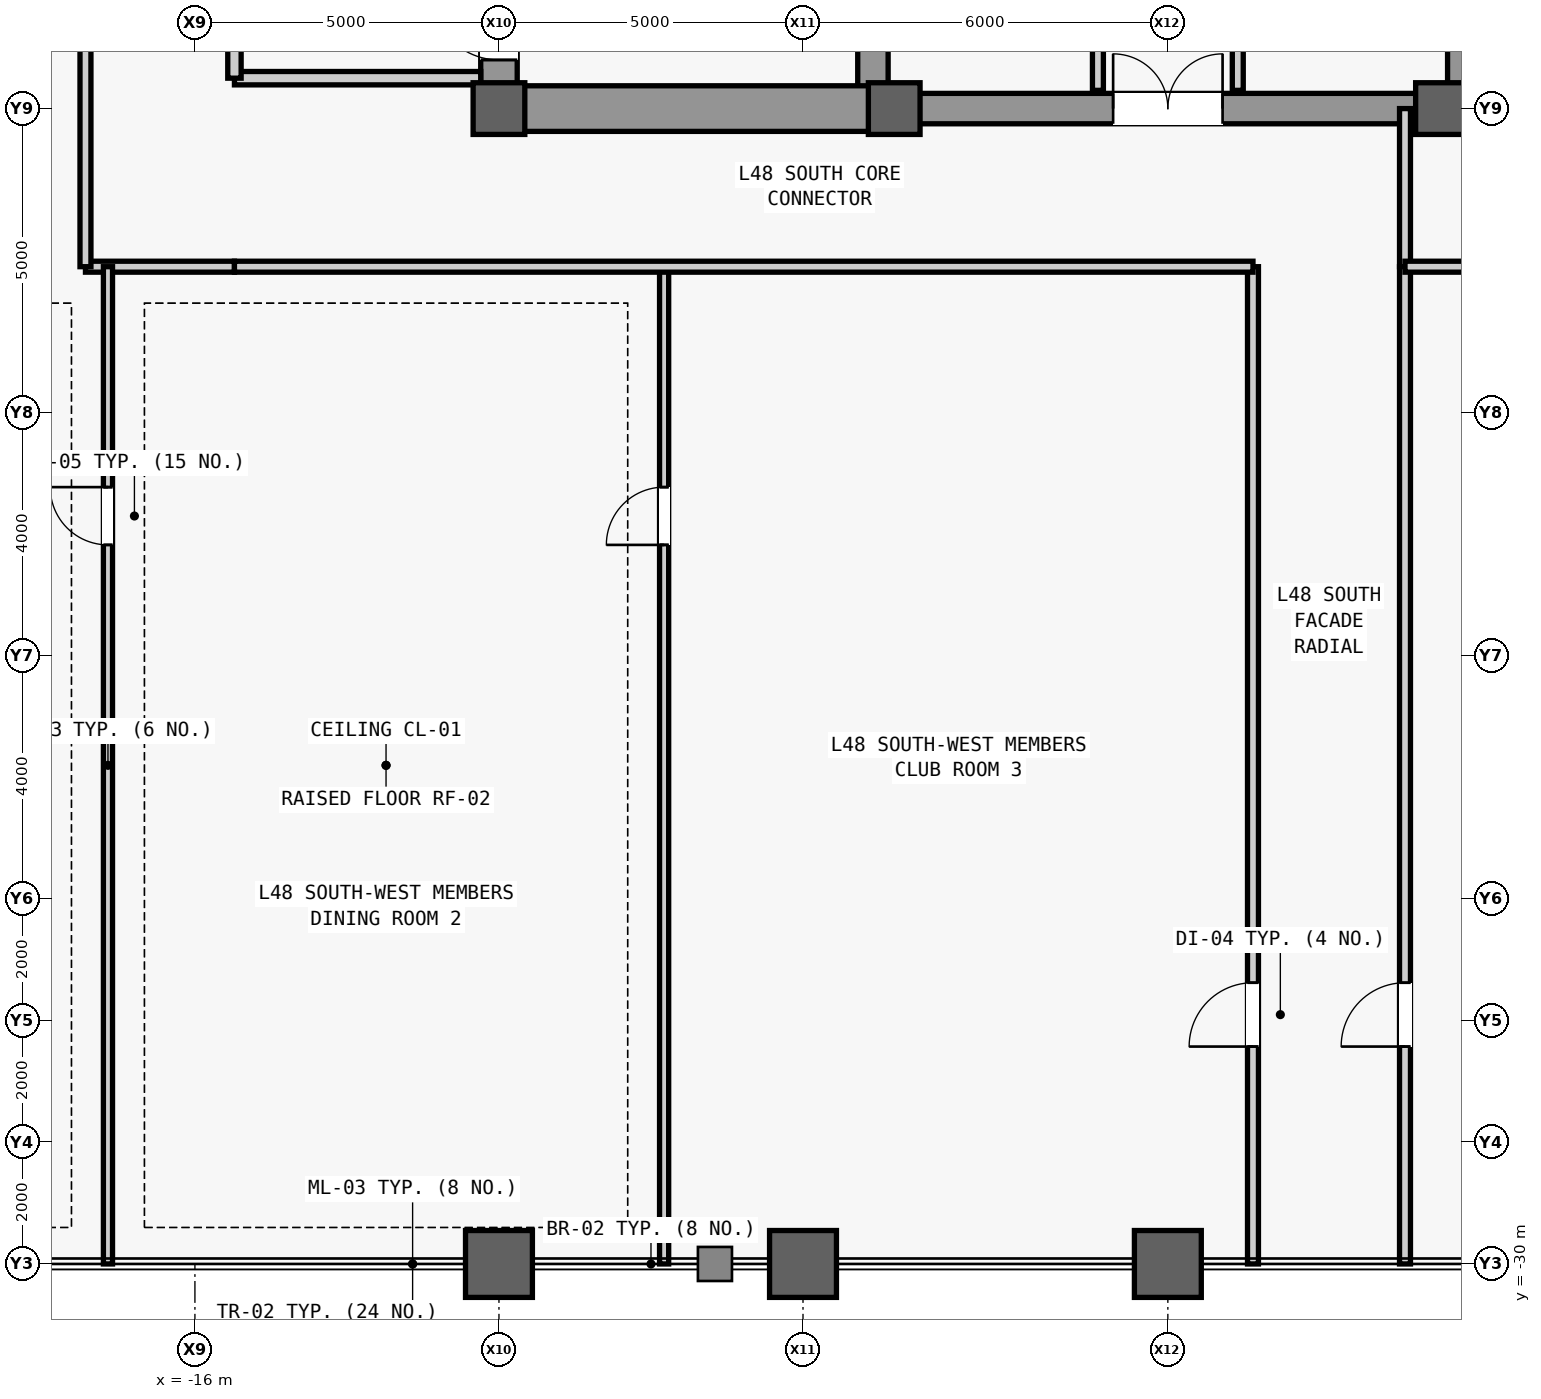
"""IFC4 building model, lengths in metres.
Left out: names, types, materials, properties, quantities, classifications, styles, units other than length and angle.
Written with IfcOpenShell. Run it as: python <this file> out.ifc"""

import sys

from ifc_helpers import new_model, si_unit, direction, frame, frame_2d, origin, origin_2d, place, context, subcontext, project, spatial, rectangle, hollow_rectangle, extrude, source, transform, mapped, element, fill, save


model = new_model("IFC4")
c1 = context("Model", 3, precision=1e-05, world=origin(), true_north=direction((0.0, 1.0)))
c2 = subcontext(c1, "Body", "Model", "MODEL_VIEW")
j1 = project(units=[si_unit("LENGTHUNIT", "METRE"), si_unit("PLANEANGLEUNIT", "RADIAN")], contexts=[c1])
p1 = place(None, origin())
s1 = spatial("IfcSite", under=j1, at=p1, CompositionType="ELEMENT")
p2 = place(p1, origin())
s2 = spatial("IfcBuilding", under=s1, at=p2, CompositionType="ELEMENT")
p3 = place(p2, frame((0.0, 0.0, 207.1)))
s3 = spatial("IfcBuildingStorey", under=s2, at=p3, CompositionType="ELEMENT", Elevation=207.1)
m1 = source(origin(), c2, "Body", "SweptSolid", [
    extrude(rectangle(XDim=22.0, YDim=0.6, at=frame_2d((11.0, 0.0))), origin(), (0.0, 0.0, 1.0), 3.78),
])
p4 = place(p3, frame((-11.0, -11.0, 0.0), z_axis=(0.0, 0.0, 1.0), x_axis=(0.0, 1.0, 0.0)))
e1 = element("IfcWall", 1, at=p4, inside=s3, PredefinedType="SHEAR", context=c2, shape_type="MappedRepresentation", body=[
    mapped(m1, transform((0.0, 0.0, 0.0), scale=1.0)),
])
m2 = source(origin(), c2, "Body", "SweptSolid", [
    extrude(rectangle(XDim=1.1, YDim=2.2, at=frame_2d((0.55, 1.1))), frame((0.0, 0.31, 0.0), z_axis=(0.0, -1.0, 0.0), x_axis=(1.0, 0.0, 0.0)), (0.0, 0.0, 1.0), 0.62),
])
p5 = place(p4, frame((0.8, 0.0, 0.0)))
e2 = element("IfcOpeningElement", 2, at=p5, cuts=e1, PredefinedType="OPENING", context=c2, shape_type="MappedRepresentation", body=[
    mapped(m2, transform((0.0, 0.0, 0.0), scale=1.0)),
])
p6 = place(p4, frame((12.5, 0.0, 0.0)))
e3 = element("IfcOpeningElement", 3, at=p6, cuts=e1, PredefinedType="OPENING", context=c2, shape_type="MappedRepresentation", body=[
    mapped(m2, transform((0.0, 0.0, 0.0), scale=1.0)),
])
m3 = source(origin(), c2, "Body", "SweptSolid", [
    extrude(rectangle(XDim=0.9, YDim=2.15, at=frame_2d((0.45, 1.075))), frame((0.0, 0.31, 0.0), z_axis=(0.0, -1.0, 0.0), x_axis=(1.0, 0.0, 0.0)), (0.0, 0.0, 1.0), 0.62),
])
p7 = place(p4, frame((7.575, 0.0, 0.0)))
e4 = element("IfcOpeningElement", 4, at=p7, cuts=e1, PredefinedType="OPENING", context=c2, shape_type="MappedRepresentation", body=[
    mapped(m3, transform((0.0, 0.0, 0.0), scale=1.0)),
])
m4 = source(origin(), c2, "Body", "SweptSolid", [
    extrude(rectangle(XDim=1.3, YDim=2.3, at=frame_2d((0.65, 1.15))), frame((0.0, 0.31, 0.0), z_axis=(0.0, -1.0, 0.0), x_axis=(1.0, 0.0, 0.0)), (0.0, 0.0, 1.0), 0.62),
])
p8 = place(p4, frame((2.7, 0.0, 0.0)))
e5 = element("IfcOpeningElement", 5, at=p8, cuts=e1, PredefinedType="OPENING", context=c2, shape_type="MappedRepresentation", body=[
    mapped(m4, transform((0.0, 0.0, 0.0), scale=1.0)),
])
m5 = source(origin(), c2, "Body", "SweptSolid", [
    extrude(rectangle(XDim=21.4, YDim=0.5, at=frame_2d((10.7, 0.0))), origin(), (0.0, 0.0, 1.0), 3.78),
])
for number, where, z_axis, x_axis in (
    (6, (-4.85, -10.7, 0.0), (0.0, 0.0, 1.0), (0.0, 1.0, 0.0)),
    (7, (4.85, -10.7, 0.0), (0.0, 0.0, 1.0), (0.0, 1.0, 0.0)),
):
    element("IfcWall", number, at=place(p3, frame(where, z_axis=z_axis, x_axis=x_axis)), inside=s3, PredefinedType="SHEAR", context=c2, shape_type="MappedRepresentation", body=[
        mapped(m5, transform((0.0, 0.0, 0.0), scale=1.0)),
    ])
m6 = source(origin(), c2, "Body", "SweptSolid", [
    extrude(rectangle(XDim=5.85, YDim=0.75, at=frame_2d((2.925, 0.0))), origin(), (0.0, 0.0, 1.0), 3.78),
])
p9 = place(p3, frame((-10.7, -11.0, 0.0), z_axis=(0.0, 0.0, 1.0), x_axis=(1.0, 0.0, 0.0)))
e8 = element("IfcWall", 8, at=p9, inside=s3, PredefinedType="SHEAR", context=c2, shape_type="MappedRepresentation", body=[
    mapped(m6, transform((0.0, 0.0, 0.0), scale=1.0)),
])
m7 = source(origin(), c2, "Body", "SweptSolid", [
    extrude(rectangle(XDim=9.2, YDim=0.5, at=frame_2d((4.6, 0.0))), origin(), (0.0, 0.0, 1.0), 3.78),
])
p10 = place(p3, frame((-4.6, -11.0, 0.0), z_axis=(0.0, 0.0, 1.0), x_axis=(1.0, 0.0, 0.0)))
e9 = element("IfcWall", 9, at=p10, inside=s3, PredefinedType="SHEAR", context=c2, shape_type="MappedRepresentation", body=[
    mapped(m7, transform((0.0, 0.0, 0.0), scale=1.0)),
])
m8 = source(origin(), c2, "Body", "SweptSolid", [
    extrude(rectangle(XDim=1.8, YDim=2.25, at=frame_2d((0.9, 1.125))), frame((0.0, 0.26, 0.0), z_axis=(0.0, -1.0, 0.0), x_axis=(1.0, 0.0, 0.0)), (0.0, 0.0, 1.0), 0.52),
])
p11 = place(p10, frame((3.7, 0.0, 0.0)))
e10 = element("IfcOpeningElement", 10, at=p11, cuts=e9, PredefinedType="OPENING", context=c2, shape_type="MappedRepresentation", body=[
    mapped(m8, transform((0.0, 0.0, 0.0), scale=1.0)),
])
m9 = source(origin(), c2, "Body", "SweptSolid", [
    extrude(hollow_rectangle(XDim=1.1, YDim=1.1, WallThickness=0.06, at=origin_2d()), origin(), (0.0, 0.0, 1.0), 4.0),
])
p12 = place(p3, frame((-11.0, -30.0, 0.0), z_axis=(0.0, 0.0, 1.0), x_axis=(1.0, 0.0, 0.0)))
e11 = element("IfcColumn", 11, at=p12, inside=s3, PredefinedType="COLUMN", context=c2, shape_type="MappedRepresentation", body=[
    mapped(m9, transform((0.0, 0.0, 0.0), scale=1.0)),
])
m10 = source(origin(), c2, "Body", "SweptSolid", [
    extrude(rectangle(XDim=0.85, YDim=0.85, at=origin_2d()), origin(), (0.0, 0.0, 1.0), 4.0),
])
p13 = place(p3, frame((-11.0, -11.0, 0.0), z_axis=(0.0, 0.0, 1.0), x_axis=(1.0, 0.0, 0.0)))
e12 = element("IfcColumn", 12, at=p13, inside=s3, PredefinedType="COLUMN", context=c2, shape_type="MappedRepresentation", body=[
    mapped(m10, transform((0.0, 0.0, 0.0), scale=1.0)),
])
p14 = place(p3, frame((-6.0, -30.0, 0.0), z_axis=(0.0, 0.0, 1.0), x_axis=(1.0, 0.0, 0.0)))
e13 = element("IfcColumn", 13, at=p14, inside=s3, PredefinedType="COLUMN", context=c2, shape_type="MappedRepresentation", body=[
    mapped(m9, transform((0.0, 0.0, 0.0), scale=1.0)),
])
p15 = place(p3, frame((-4.5, -11.0, 0.0), z_axis=(0.0, 0.0, 1.0), x_axis=(1.0, 0.0, 0.0)))
e14 = element("IfcColumn", 14, at=p15, inside=s3, PredefinedType="COLUMN", context=c2, shape_type="MappedRepresentation", body=[
    mapped(m10, transform((0.0, 0.0, 0.0), scale=1.0)),
])
p16 = place(p3, frame((0.0, -30.0, 0.0), z_axis=(0.0, 0.0, 1.0), x_axis=(1.0, 0.0, 0.0)))
e15 = element("IfcColumn", 15, at=p16, inside=s3, PredefinedType="COLUMN", context=c2, shape_type="MappedRepresentation", body=[
    mapped(m9, transform((0.0, 0.0, 0.0), scale=1.0)),
])
p17 = place(p3, frame((4.5, -11.0, 0.0), z_axis=(0.0, 0.0, 1.0), x_axis=(1.0, 0.0, 0.0)))
e16 = element("IfcColumn", 16, at=p17, inside=s3, PredefinedType="COLUMN", context=c2, shape_type="MappedRepresentation", body=[
    mapped(m10, transform((0.0, 0.0, 0.0), scale=1.0)),
])
m11 = source(origin(), c2, "Body", "SweptSolid", [
    extrude(rectangle(XDim=4.05, YDim=0.22, at=frame_2d((2.025, 0.0))), origin(), (0.0, 0.0, 1.0), 3.78),
])
p18 = place(p3, frame((-15.35, -10.5, 0.0), z_axis=(0.0, 0.0, 1.0), x_axis=(1.0, 0.0, 0.0)))
e17 = element("IfcWall", 17, at=p18, inside=s3, PredefinedType="PARTITIONING", context=c2, shape_type="MappedRepresentation", body=[
    mapped(m11, transform((0.0, 0.0, 0.0), scale=1.0)),
])
m12 = source(origin(), c2, "Body", "SweptSolid", [
    extrude(rectangle(XDim=4.4, YDim=0.22, at=frame_2d((2.2, 0.0))), origin(), (0.0, 0.0, 1.0), 3.78),
])
p19 = place(p3, frame((-15.35, -10.5, 0.0), z_axis=(0.0, 0.0, 1.0), x_axis=(0.0, 1.0, 0.0)))
e18 = element("IfcWall", 18, at=p19, inside=s3, PredefinedType="PARTITIONING", context=c2, shape_type="MappedRepresentation", body=[
    mapped(m12, transform((0.0, 0.0, 0.0), scale=1.0)),
])
m13 = source(origin(), c2, "Body", "SweptSolid", [
    extrude(rectangle(XDim=1.2, YDim=2.2, at=frame_2d((0.6, 1.1))), frame((0.0, 0.12, 0.0), z_axis=(0.0, -1.0, 0.0), x_axis=(1.0, 0.0, 0.0)), (0.0, 0.0, 1.0), 0.24),
])
p20 = place(p19, frame((1.6, 0.0, 0.0)))
e19 = element("IfcOpeningElement", 19, at=p20, cuts=e18, PredefinedType="OPENING", context=c2, shape_type="MappedRepresentation", body=[
    mapped(m13, transform((0.0, 0.0, 0.0), scale=1.0)),
])
m14 = source(origin(), c2, "Body", "SweptSolid", [
    extrude(rectangle(XDim=5.4, YDim=0.18, at=frame_2d((2.7, 0.0))), origin(), (0.0, 0.0, 1.0), 3.78),
])
p21 = place(p3, frame((-1.15, -10.7, 0.0), z_axis=(0.0, 0.0, 1.0), x_axis=(0.0, 1.0, 0.0)))
e20 = element("IfcWall", 20, at=p21, inside=s3, PredefinedType="PARTITIONING", context=c2, shape_type="MappedRepresentation", body=[
    mapped(m14, transform((0.0, 0.0, 0.0), scale=1.0)),
])
m15 = source(origin(), c2, "Body", "SweptSolid", [
    extrude(rectangle(XDim=0.9, YDim=2.15, at=frame_2d((0.45, 1.075))), frame((0.0, 0.1, 0.0), z_axis=(0.0, -1.0, 0.0), x_axis=(1.0, 0.0, 0.0)), (0.0, 0.0, 1.0), 0.2),
])
p22 = place(p21, frame((1.15, 0.0, 0.0)))
e21 = element("IfcOpeningElement", 21, at=p22, cuts=e20, PredefinedType="OPENING", context=c2, shape_type="MappedRepresentation", body=[
    mapped(m15, transform((0.0, 0.0, 0.0), scale=1.0)),
])
p23 = place(p21, frame((3.85, 0.0, 0.0)))
e22 = element("IfcOpeningElement", 22, at=p23, cuts=e20, PredefinedType="OPENING", context=c2, shape_type="MappedRepresentation", body=[
    mapped(m15, transform((0.0, 0.0, 0.0), scale=1.0)),
])
p24 = place(p3, frame((1.15, -10.7, 0.0), z_axis=(0.0, 0.0, 1.0), x_axis=(0.0, 1.0, 0.0)))
e23 = element("IfcWall", 23, at=p24, inside=s3, PredefinedType="PARTITIONING", context=c2, shape_type="MappedRepresentation", body=[
    mapped(m14, transform((0.0, 0.0, 0.0), scale=1.0)),
])
p25 = place(p24, frame((2.25, 0.0, 0.0)))
e24 = element("IfcOpeningElement", 24, at=p25, cuts=e23, PredefinedType="OPENING", context=c2, shape_type="MappedRepresentation", body=[
    mapped(m15, transform((0.0, 0.0, 0.0), scale=1.0)),
])
m16 = source(origin(), c2, "Body", "SweptSolid", [
    extrude(rectangle(XDim=2.45, YDim=0.18, at=frame_2d((1.225, 0.0))), origin(), (0.0, 0.0, 1.0), 3.78),
])
p26 = place(p3, frame((-17.8, -13.6, 0.0), z_axis=(0.0, 0.0, 1.0), x_axis=(1.0, 0.0, 0.0)))
e25 = element("IfcWall", 25, at=p26, inside=s3, PredefinedType="PARTITIONING", context=c2, shape_type="MappedRepresentation", body=[
    mapped(m16, transform((0.0, 0.0, 0.0), scale=1.0)),
])
m17 = source(origin(), c2, "Body", "SweptSolid", [
    extrude(rectangle(XDim=2.6, YDim=0.18, at=frame_2d((1.3, 0.0))), origin(), (0.0, 0.0, 1.0), 3.78),
])
p27 = place(p3, frame((3.9, -13.6, 0.0), z_axis=(0.0, 0.0, 1.0), x_axis=(0.0, 1.0, 0.0)))
e26 = element("IfcWall", 26, at=p27, inside=s3, PredefinedType="PARTITIONING", context=c2, shape_type="MappedRepresentation", body=[
    mapped(m17, transform((0.0, 0.0, 0.0), scale=1.0)),
])
m18 = source(origin(), c2, "Body", "SweptSolid", [
    extrude(rectangle(XDim=16.4, YDim=0.15, at=frame_2d((8.2, 0.0))), origin(), (0.0, 0.0, 1.0), 3.78),
])
p28 = place(p3, frame((-17.43, -30.0, 0.0), z_axis=(0.0, 0.0, 1.0), x_axis=(0.0, 1.0, 0.0)))
e27 = element("IfcWall", 27, at=p28, inside=s3, PredefinedType="PARTITIONING", context=c2, shape_type="MappedRepresentation", body=[
    mapped(m18, transform((0.0, 0.0, 0.0), scale=1.0)),
])
m19 = source(origin(), c2, "Body", "SweptSolid", [
    extrude(rectangle(XDim=0.95, YDim=2.15, at=frame_2d((0.475, 1.075))), frame((0.0, 0.085, 0.0), z_axis=(0.0, -1.0, 0.0), x_axis=(1.0, 0.0, 0.0)), (0.0, 0.0, 1.0), 0.17),
])
p29 = place(p28, frame((11.825, 0.0, 0.0)))
e28 = element("IfcOpeningElement", 28, at=p29, cuts=e27, PredefinedType="OPENING", context=c2, shape_type="MappedRepresentation", body=[
    mapped(m19, transform((0.0, 0.0, 0.0), scale=1.0)),
])
p30 = place(p3, frame((-8.284, -30.0, 0.0), z_axis=(0.0, 0.0, 1.0), x_axis=(0.0, 1.0, 0.0)))
e29 = element("IfcWall", 29, at=p30, inside=s3, PredefinedType="PARTITIONING", context=c2, shape_type="MappedRepresentation", body=[
    mapped(m18, transform((0.0, 0.0, 0.0), scale=1.0)),
])
p31 = place(p30, frame((11.825, 0.0, 0.0)))
e30 = element("IfcOpeningElement", 30, at=p31, cuts=e29, PredefinedType="OPENING", context=c2, shape_type="MappedRepresentation", body=[
    mapped(m19, transform((0.0, 0.0, 0.0), scale=1.0)),
])
m20 = source(origin(), c2, "Body", "SweptSolid", [
    extrude(rectangle(XDim=16.4, YDim=0.18, at=frame_2d((8.2, 0.0))), origin(), (0.0, 0.0, 1.0), 3.78),
])
p32 = place(p3, frame((1.4, -30.0, 0.0), z_axis=(0.0, 0.0, 1.0), x_axis=(0.0, 1.0, 0.0)))
e31 = element("IfcWall", 31, at=p32, inside=s3, PredefinedType="PARTITIONING", context=c2, shape_type="MappedRepresentation", body=[
    mapped(m20, transform((0.0, 0.0, 0.0), scale=1.0)),
])
m21 = source(origin(), c2, "Body", "SweptSolid", [
    extrude(rectangle(XDim=1.05, YDim=2.2, at=frame_2d((0.525, 1.1))), frame((0.0, 0.1, 0.0), z_axis=(0.0, -1.0, 0.0), x_axis=(1.0, 0.0, 0.0)), (0.0, 0.0, 1.0), 0.2),
])
p33 = place(p32, frame((3.575, 0.0, 0.0)))
e32 = element("IfcOpeningElement", 32, at=p33, cuts=e31, PredefinedType="OPENING", context=c2, shape_type="MappedRepresentation", body=[
    mapped(m21, transform((0.0, 0.0, 0.0), scale=1.0)),
])
m22 = source(origin(), c2, "Body", "SweptSolid", [
    extrude(rectangle(XDim=16.75, YDim=0.18, at=frame_2d((8.375, 0.0))), origin(), (0.0, 0.0, 1.0), 3.78),
])
p34 = place(p3, frame((-15.35, -13.6, 0.0), z_axis=(0.0, 0.0, 1.0), x_axis=(1.0, 0.0, 0.0)))
e33 = element("IfcWall", 33, at=p34, inside=s3, PredefinedType="PARTITIONING", context=c2, shape_type="MappedRepresentation", body=[
    mapped(m22, transform((0.0, 0.0, 0.0), scale=1.0)),
])
p35 = place(p3, frame((3.9, -30.0, 0.0), z_axis=(0.0, 0.0, 1.0), x_axis=(0.0, 1.0, 0.0)))
e34 = element("IfcWall", 34, at=p35, inside=s3, PredefinedType="PARTITIONING", context=c2, shape_type="MappedRepresentation", body=[
    mapped(m20, transform((0.0, 0.0, 0.0), scale=1.0)),
])
p36 = place(p35, frame((3.575, 0.0, 0.0)))
e35 = element("IfcOpeningElement", 35, at=p36, cuts=e34, PredefinedType="OPENING", context=c2, shape_type="MappedRepresentation", body=[
    mapped(m21, transform((0.0, 0.0, 0.0), scale=1.0)),
])
m23 = source(origin(), c2, "Body", "SweptSolid", [
    extrude(rectangle(XDim=11.45, YDim=0.18, at=frame_2d((5.725, 0.0))), origin(), (0.0, 0.0, 1.0), 3.78),
])
p37 = place(p3, frame((3.9, -13.6, 0.0), z_axis=(0.0, 0.0, 1.0), x_axis=(1.0, 0.0, 0.0)))
e36 = element("IfcWall", 36, at=p37, inside=s3, PredefinedType="PARTITIONING", context=c2, shape_type="MappedRepresentation", body=[
    mapped(m23, transform((0.0, 0.0, 0.0), scale=1.0)),
])
m24 = source(origin(), c2, "Body", "SweptSolid", [
    extrude(rectangle(XDim=11.6, YDim=0.18, at=frame_2d((5.8, 0.0))), origin(), (0.0, 0.0, 1.0), 3.78),
])
p38 = place(p3, frame((-17.8, -13.6, 0.0), z_axis=(0.0, 0.0, 1.0), x_axis=(0.0, 1.0, 0.0)))
e37 = element("IfcWall", 37, at=p38, inside=s3, PredefinedType="PARTITIONING", context=c2, shape_type="MappedRepresentation", body=[
    mapped(m24, transform((0.0, 0.0, 0.0), scale=1.0)),
])
m25 = source(origin(), c2, "Body", "SweptSolid", [
    extrude(rectangle(XDim=1.1, YDim=2.2, at=frame_2d((0.55, 1.1))), frame((0.0, 0.025, 0.0), z_axis=(0.0, -1.0, 0.0), x_axis=(1.0, 0.0, 0.0)), (0.0, 0.0, 1.0), 0.05),
])
p39 = place(p5, origin())
e38 = element("IfcDoor", 38, at=p39, inside=s3, OperationType="SINGLE_SWING_RIGHT", PredefinedType="DOOR", context=c2, shape_type="MappedRepresentation", body=[
    mapped(m25, transform((0.0, 0.0, 0.0), scale=1.0)),
])
fill(e2, e38)
m26 = source(origin(), c2, "Body", "SweptSolid", [
    extrude(rectangle(XDim=1.8, YDim=2.25, at=frame_2d((0.9, 1.125))), frame((0.0, 0.025, 0.0), z_axis=(0.0, -1.0, 0.0), x_axis=(1.0, 0.0, 0.0)), (0.0, 0.0, 1.0), 0.05),
])
p40 = place(p11, origin())
e39 = element("IfcDoor", 39, at=p40, inside=s3, OperationType="SINGLE_SWING_LEFT", PredefinedType="DOOR", context=c2, shape_type="MappedRepresentation", body=[
    mapped(m26, transform((0.0, 0.0, 0.0), scale=1.0)),
])
fill(e10, e39)
m27 = source(origin(), c2, "Body", "SweptSolid", [
    extrude(rectangle(XDim=0.95, YDim=2.15, at=frame_2d((0.475, 1.075))), frame((0.0, 0.025, 0.0), z_axis=(0.0, -1.0, 0.0), x_axis=(1.0, 0.0, 0.0)), (0.0, 0.0, 1.0), 0.05),
])
p41 = place(p29, origin())
e40 = element("IfcDoor", 40, at=p41, inside=s3, OperationType="SINGLE_SWING_RIGHT", PredefinedType="DOOR", context=c2, shape_type="MappedRepresentation", body=[
    mapped(m27, transform((0.0, 0.0, 0.0), scale=1.0)),
])
fill(e28, e40)
p42 = place(p31, origin())
e41 = element("IfcDoor", 41, at=p42, inside=s3, OperationType="SINGLE_SWING_LEFT", PredefinedType="DOOR", context=c2, shape_type="MappedRepresentation", body=[
    mapped(m27, transform((0.0, 0.0, 0.0), scale=1.0)),
])
fill(e30, e41)
m28 = source(origin(), c2, "Body", "SweptSolid", [
    extrude(rectangle(XDim=1.05, YDim=2.2, at=frame_2d((0.525, 1.1))), frame((0.0, 0.025, 0.0), z_axis=(0.0, -1.0, 0.0), x_axis=(1.0, 0.0, 0.0)), (0.0, 0.0, 1.0), 0.05),
])
p43 = place(p33, origin())
e42 = element("IfcDoor", 42, at=p43, inside=s3, OperationType="SINGLE_SWING_LEFT", PredefinedType="DOOR", context=c2, shape_type="MappedRepresentation", body=[
    mapped(m28, transform((0.0, 0.0, 0.0), scale=1.0)),
])
fill(e32, e42)
p44 = place(p36, origin())
e43 = element("IfcDoor", 43, at=p44, inside=s3, OperationType="SINGLE_SWING_LEFT", PredefinedType="DOOR", context=c2, shape_type="MappedRepresentation", body=[
    mapped(m28, transform((0.0, 0.0, 0.0), scale=1.0)),
])
fill(e35, e43)
save(model, sys.argv[1])
